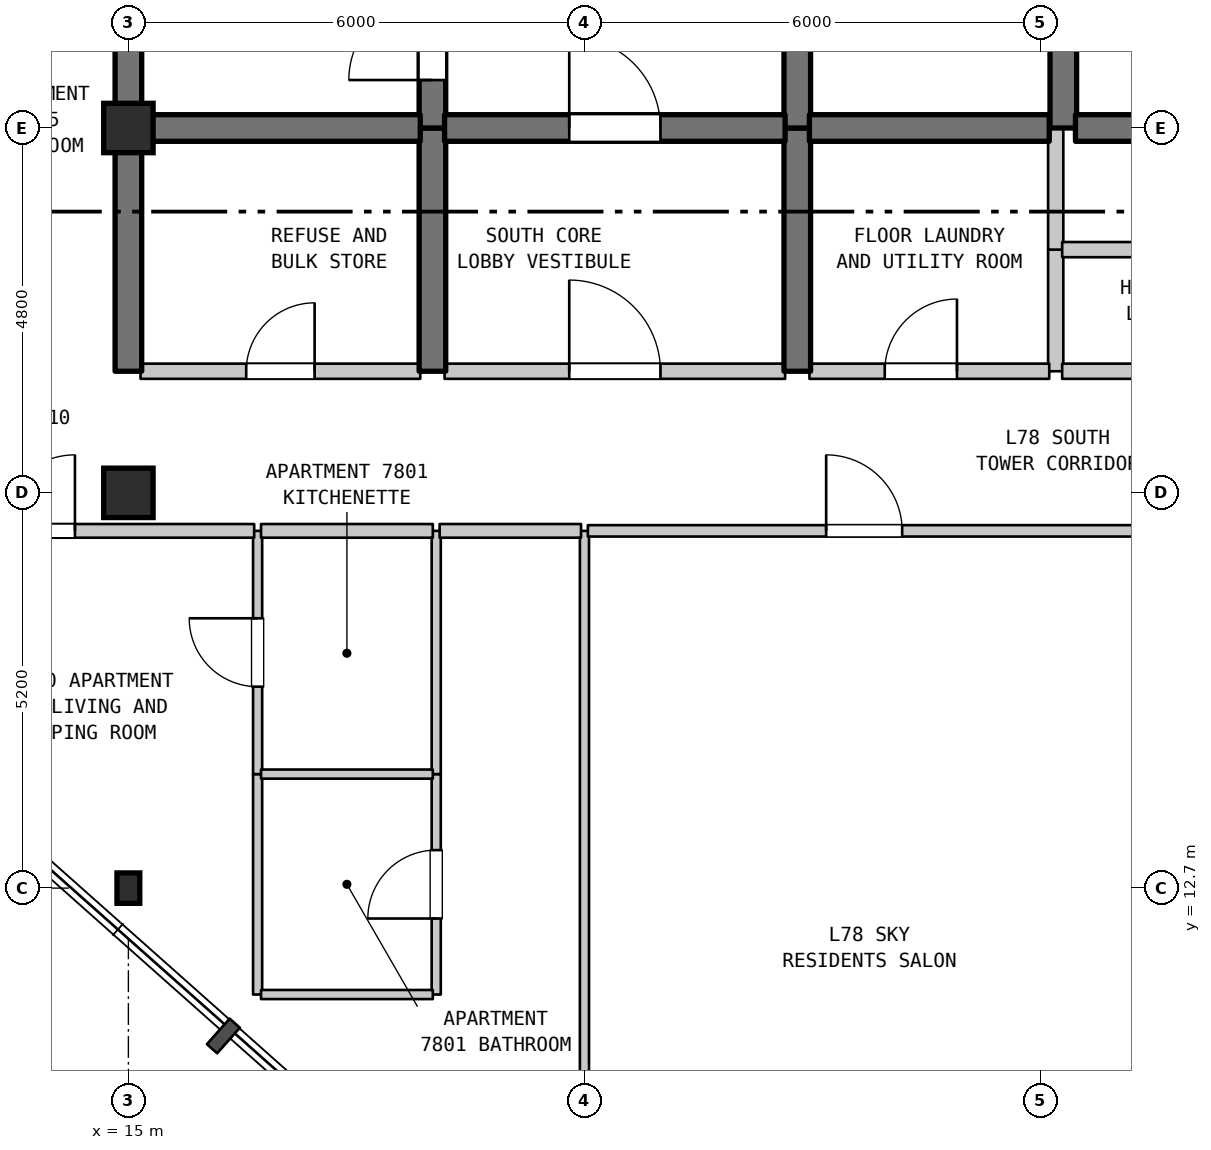
"""IFC4 building model, lengths in metres.
Left out: names, types, materials, properties, quantities, classifications, styles, units other than length and angle.
Written with IfcOpenShell. Run it as: python <this file> out.ifc"""

import sys

from ifc_helpers import new_model, si_unit, direction, frame, frame_2d, origin, origin_2d, place, context, subcontext, project, spatial, rectangle, i_section, extrude, element, fill, save


model = new_model("IFC4")
c1 = context("Model", 3, precision=1e-05, world=origin(), true_north=direction((0.0, 1.0)))
c2 = subcontext(c1, "Body", "Model", "MODEL_VIEW")
j1 = project(units=[si_unit("LENGTHUNIT", "METRE"), si_unit("PLANEANGLEUNIT", "RADIAN")], contexts=[c1])
p1 = place(None, origin())
s1 = spatial("IfcSite", under=j1, at=p1, CompositionType="ELEMENT")
p2 = place(p1, origin())
s2 = spatial("IfcBuilding", under=s1, at=p2, CompositionType="ELEMENT")
p3 = place(p2, frame((0.0, 0.0, 311.0)))
s3 = spatial("IfcBuildingStorey", under=s2, at=p3, CompositionType="ELEMENT", Elevation=311.0)
p4 = place(p3, frame((15.0, 12.7, 0.0), z_axis=(0.0, 0.0, 1.0), x_axis=(1.0, 0.0, 0.0)))
e1 = element("IfcColumn", 1, at=p4, inside=s3, PredefinedType="COLUMN", context=c2, shape_type="SweptSolid", body=[
    extrude(i_section(OverallWidth=0.3, OverallDepth=0.4, WebThickness=0.013, FlangeThickness=0.024, FilletRadius=0.027, at=origin_2d()), origin(), (0.0, 0.0, 1.0), 3.7),
])
for number, where, z_axis, x_axis in (
    (2, (15.0, 17.9, 0.0), (0.0, 0.0, 1.0), (1.0, 0.0, 0.0)),
    (3, (15.0, 22.7, 0.0), (0.0, 0.0, 1.0), (1.0, 0.0, 0.0)),
):
    element("IfcColumn", number, at=place(p3, frame(where, z_axis=z_axis, x_axis=x_axis)), inside=s3, PredefinedType="COLUMN", context=c2, shape_type="SweptSolid", body=[
        extrude(rectangle(XDim=0.65, YDim=0.65, at=origin_2d()), origin(), (0.0, 0.0, 1.0), 3.7),
    ])
p5 = place(p3, frame((15.0, 19.5, 0.0), z_axis=(0.0, 0.0, 1.0), x_axis=(0.0, 1.0, 0.0)))
e4 = element("IfcWall", 4, at=p5, inside=s3, PredefinedType="SHEAR", context=c2, shape_type="SweptSolid", body=[
    extrude(rectangle(XDim=3.2, YDim=0.35, at=frame_2d((1.6, 0.0))), origin(), (0.0, 0.0, 1.0), 3.28),
])
p6 = place(p3, frame((15.0, 22.7, 0.0), z_axis=(0.0, 0.0, 1.0), x_axis=(0.0, 1.0, 0.0)))
e5 = element("IfcWall", 5, at=p6, inside=s3, PredefinedType="SHEAR", context=c2, shape_type="SweptSolid", body=[
    extrude(rectangle(XDim=6.8, YDim=0.35, at=frame_2d((3.4, 0.0))), origin(), (0.0, 0.0, 1.0), 3.28),
])
p7 = place(p3, frame((16.7, 11.3, 0.0), z_axis=(0.0, 0.0, 1.0), x_axis=(0.0, 1.0, 0.0)))
e6 = element("IfcWall", 6, at=p7, inside=s3, PredefinedType="PARTITIONING", context=c2, shape_type="SweptSolid", body=[
    extrude(rectangle(XDim=2.9, YDim=0.12, at=frame_2d((1.45, 0.0))), origin(), (0.0, 0.0, 1.0), 3.28),
])
p8 = place(p3, frame((16.7, 14.2, 0.0), z_axis=(0.0, 0.0, 1.0), x_axis=(0.0, 1.0, 0.0)))
e7 = element("IfcWall", 7, at=p8, inside=s3, PredefinedType="PARTITIONING", context=c2, shape_type="SweptSolid", body=[
    extrude(rectangle(XDim=3.2, YDim=0.12, at=frame_2d((1.6, 0.0))), origin(), (0.0, 0.0, 1.0), 3.28),
])
p9 = place(p8, frame((1.15, 0.0, 0.0)))
e8 = element("IfcOpeningElement", 8, at=p9, cuts=e7, PredefinedType="OPENING", context=c2, shape_type="SweptSolid", body=[
    extrude(rectangle(XDim=0.9, YDim=2.15, at=frame_2d((0.45, 1.075))), frame((0.0, 0.07, 0.0), z_axis=(0.0, -1.0, 0.0), x_axis=(1.0, 0.0, 0.0)), (0.0, 0.0, 1.0), 0.14),
])
p10 = place(p3, frame((19.0, 19.5, 0.0), z_axis=(0.0, 0.0, 1.0), x_axis=(0.0, 1.0, 0.0)))
e9 = element("IfcWall", 9, at=p10, inside=s3, PredefinedType="SHEAR", context=c2, shape_type="SweptSolid", body=[
    extrude(rectangle(XDim=3.2, YDim=0.35, at=frame_2d((1.6, 0.0))), origin(), (0.0, 0.0, 1.0), 3.28),
])
p11 = place(p3, frame((19.0, 22.7, 0.0), z_axis=(0.0, 0.0, 1.0), x_axis=(0.0, 1.0, 0.0)))
e10 = element("IfcWall", 10, at=p11, inside=s3, PredefinedType="SHEAR", context=c2, shape_type="SweptSolid", body=[
    extrude(rectangle(XDim=5.5, YDim=0.35, at=frame_2d((2.75, 0.0))), origin(), (0.0, 0.0, 1.0), 3.28),
])
p12 = place(p11, frame((0.631, 0.0, 0.0)))
e11 = element("IfcOpeningElement", 11, at=p12, cuts=e10, PredefinedType="OPENING", context=c2, shape_type="SweptSolid", body=[
    extrude(rectangle(XDim=1.1, YDim=2.15, at=frame_2d((0.55, 1.075))), frame((0.0, 0.185, 0.0), z_axis=(0.0, -1.0, 0.0), x_axis=(1.0, 0.0, 0.0)), (0.0, 0.0, 1.0), 0.37),
])
p13 = place(p3, frame((19.05, 11.3, 0.0), z_axis=(0.0, 0.0, 1.0), x_axis=(0.0, 1.0, 0.0)))
e12 = element("IfcWall", 12, at=p13, inside=s3, PredefinedType="PARTITIONING", context=c2, shape_type="SweptSolid", body=[
    extrude(rectangle(XDim=2.9, YDim=0.12, at=frame_2d((1.45, 0.0))), origin(), (0.0, 0.0, 1.0), 3.28),
])
p14 = place(p13, frame((1.0, 0.0, 0.0)))
e13 = element("IfcOpeningElement", 13, at=p14, cuts=e12, PredefinedType="OPENING", context=c2, shape_type="SweptSolid", body=[
    extrude(rectangle(XDim=0.9, YDim=2.1, at=frame_2d((0.45, 1.05))), frame((0.0, 0.07, 0.0), z_axis=(0.0, -1.0, 0.0), x_axis=(1.0, 0.0, 0.0)), (0.0, 0.0, 1.0), 0.14),
])
p15 = place(p3, frame((19.05, 14.2, 0.0), z_axis=(0.0, 0.0, 1.0), x_axis=(0.0, 1.0, 0.0)))
e14 = element("IfcWall", 14, at=p15, inside=s3, PredefinedType="PARTITIONING", context=c2, shape_type="SweptSolid", body=[
    extrude(rectangle(XDim=3.2, YDim=0.12, at=frame_2d((1.6, 0.0))), origin(), (0.0, 0.0, 1.0), 3.28),
])
p16 = place(p3, frame((21.0, 6.999, 0.0), z_axis=(0.0, 0.0, 1.0), x_axis=(0.0, 1.0, 0.0)))
e15 = element("IfcWall", 15, at=p16, inside=s3, PredefinedType="PARTITIONING", context=c2, shape_type="SweptSolid", body=[
    extrude(rectangle(XDim=10.401, YDim=0.12, at=frame_2d((5.2, 0.0))), origin(), (0.0, 0.0, 1.0), 3.28),
])
p17 = place(p3, frame((23.8, 19.5, 0.0), z_axis=(0.0, 0.0, 1.0), x_axis=(0.0, 1.0, 0.0)))
e16 = element("IfcWall", 16, at=p17, inside=s3, PredefinedType="SHEAR", context=c2, shape_type="SweptSolid", body=[
    extrude(rectangle(XDim=3.2, YDim=0.35, at=frame_2d((1.6, 0.0))), origin(), (0.0, 0.0, 1.0), 3.28),
])
p18 = place(p3, frame((23.8, 22.7, 0.0), z_axis=(0.0, 0.0, 1.0), x_axis=(0.0, 1.0, 0.0)))
e17 = element("IfcWall", 17, at=p18, inside=s3, PredefinedType="SHEAR", context=c2, shape_type="SweptSolid", body=[
    extrude(rectangle(XDim=3.4, YDim=0.35, at=frame_2d((1.7, 0.0))), origin(), (0.0, 0.0, 1.0), 3.28),
])
p19 = place(p18, frame((1.25, 0.0, 0.0)))
e18 = element("IfcOpeningElement", 18, at=p19, cuts=e17, PredefinedType="OPENING", context=c2, shape_type="SweptSolid", body=[
    extrude(rectangle(XDim=0.9, YDim=2.15, at=frame_2d((0.45, 1.075))), frame((0.0, 0.185, 0.0), z_axis=(0.0, -1.0, 0.0), x_axis=(1.0, 0.0, 0.0)), (0.0, 0.0, 1.0), 0.37),
])
p20 = place(p3, frame((27.2, 19.5, 0.0), z_axis=(0.0, 0.0, 1.0), x_axis=(0.0, 1.0, 0.0)))
e19 = element("IfcWall", 19, at=p20, inside=s3, PredefinedType="STANDARD", context=c2, shape_type="SweptSolid", body=[
    extrude(rectangle(XDim=1.6, YDim=0.2, at=frame_2d((0.8, 0.0))), origin(), (0.0, 0.0, 1.0), 3.28),
])
p21 = place(p3, frame((27.2, 21.1, 0.0), z_axis=(0.0, 0.0, 1.0), x_axis=(0.0, 1.0, 0.0)))
e20 = element("IfcWall", 20, at=p21, inside=s3, PredefinedType="STANDARD", context=c2, shape_type="SweptSolid", body=[
    extrude(rectangle(XDim=1.6, YDim=0.2, at=frame_2d((0.8, 0.0))), origin(), (0.0, 0.0, 1.0), 3.28),
])
p22 = place(p3, frame((27.3, 22.7, 0.0), z_axis=(0.0, 0.0, 1.0), x_axis=(0.0, 1.0, 0.0)))
e21 = element("IfcWall", 21, at=p22, inside=s3, PredefinedType="SHEAR", context=c2, shape_type="SweptSolid", body=[
    extrude(rectangle(XDim=2.9, YDim=0.35, at=frame_2d((1.45, 0.0))), origin(), (0.0, 0.0, 1.0), 3.28),
])
for number, where, z_axis, x_axis in (
    (22, (16.745, 11.3, 0.0), (0.0, 0.0, 1.0), (1.0, 0.0, 0.0)),
    (23, (16.745, 14.2, 0.0), (0.0, 0.0, 1.0), (1.0, 0.0, 0.0)),
):
    element("IfcWall", number, at=place(p3, frame(where, z_axis=z_axis, x_axis=x_axis)), inside=s3, PredefinedType="PARTITIONING", context=c2, shape_type="SweptSolid", body=[
        extrude(rectangle(XDim=2.26, YDim=0.12, at=frame_2d((1.13, 0.0))), origin(), (0.0, 0.0, 1.0), 3.28),
    ])
p23 = place(p3, frame((12.975, 17.4, 0.0), z_axis=(0.0, 0.0, 1.0), x_axis=(1.0, 0.0, 0.0)))
e24 = element("IfcWall", 24, at=p23, inside=s3, PredefinedType="STANDARD", context=c2, shape_type="SweptSolid", body=[
    extrude(rectangle(XDim=3.68, YDim=0.18, at=frame_2d((1.84, 0.0))), origin(), (0.0, 0.0, 1.0), 3.28),
])
p24 = place(p23, frame((0.322, 0.0, 0.0)))
e25 = element("IfcOpeningElement", 25, at=p24, cuts=e24, PredefinedType="OPENING", context=c2, shape_type="SweptSolid", body=[
    extrude(rectangle(XDim=1.0, YDim=2.15, at=frame_2d((0.5, 1.075))), frame((0.0, 0.1, 0.0), z_axis=(0.0, -1.0, 0.0), x_axis=(1.0, 0.0, 0.0)), (0.0, 0.0, 1.0), 0.2),
])
p25 = place(p3, frame((16.745, 17.4, 0.0), z_axis=(0.0, 0.0, 1.0), x_axis=(1.0, 0.0, 0.0)))
e26 = element("IfcWall", 26, at=p25, inside=s3, PredefinedType="STANDARD", context=c2, shape_type="SweptSolid", body=[
    extrude(rectangle(XDim=2.26, YDim=0.18, at=frame_2d((1.13, 0.0))), origin(), (0.0, 0.0, 1.0), 3.28),
])
p26 = place(p3, frame((19.095, 17.4, 0.0), z_axis=(0.0, 0.0, 1.0), x_axis=(1.0, 0.0, 0.0)))
e27 = element("IfcWall", 27, at=p26, inside=s3, PredefinedType="STANDARD", context=c2, shape_type="SweptSolid", body=[
    extrude(rectangle(XDim=1.86, YDim=0.18, at=frame_2d((0.93, 0.0))), origin(), (0.0, 0.0, 1.0), 3.28),
])
p27 = place(p3, frame((21.045, 17.4, 0.0), z_axis=(0.0, 0.0, 1.0), x_axis=(1.0, 0.0, 0.0)))
e28 = element("IfcWall", 28, at=p27, inside=s3, PredefinedType="STANDARD", context=c2, shape_type="SweptSolid", body=[
    extrude(rectangle(XDim=7.41, YDim=0.15, at=frame_2d((3.705, 0.0))), origin(), (0.0, 0.0, 1.0), 3.28),
])
p28 = place(p27, frame((3.135, 0.0, 0.0)))
e29 = element("IfcOpeningElement", 29, at=p28, cuts=e28, PredefinedType="OPENING", context=c2, shape_type="SweptSolid", body=[
    extrude(rectangle(XDim=1.0, YDim=2.15, at=frame_2d((0.5, 1.075))), frame((0.0, 0.085, 0.0), z_axis=(0.0, -1.0, 0.0), x_axis=(1.0, 0.0, 0.0)), (0.0, 0.0, 1.0), 0.17),
])
p29 = place(p3, frame((15.16, 19.5, 0.0), z_axis=(0.0, 0.0, 1.0), x_axis=(1.0, 0.0, 0.0)))
e30 = element("IfcWall", 30, at=p29, inside=s3, PredefinedType="STANDARD", context=c2, shape_type="SweptSolid", body=[
    extrude(rectangle(XDim=3.68, YDim=0.2, at=frame_2d((1.84, 0.0))), origin(), (0.0, 0.0, 1.0), 3.28),
])
p30 = place(p29, frame((1.39, 0.0, 0.0)))
e31 = element("IfcOpeningElement", 31, at=p30, cuts=e30, PredefinedType="OPENING", context=c2, shape_type="SweptSolid", body=[
    extrude(rectangle(XDim=0.9, YDim=2.15, at=frame_2d((0.45, 1.075))), frame((0.0, 0.11, 0.0), z_axis=(0.0, -1.0, 0.0), x_axis=(1.0, 0.0, 0.0)), (0.0, 0.0, 1.0), 0.22),
])
p31 = place(p3, frame((19.16, 19.5, 0.0), z_axis=(0.0, 0.0, 1.0), x_axis=(1.0, 0.0, 0.0)))
e32 = element("IfcWall", 32, at=p31, inside=s3, PredefinedType="STANDARD", context=c2, shape_type="SweptSolid", body=[
    extrude(rectangle(XDim=4.48, YDim=0.2, at=frame_2d((2.24, 0.0))), origin(), (0.0, 0.0, 1.0), 3.28),
])
p32 = place(p31, frame((1.64, 0.0, 0.0)))
e33 = element("IfcOpeningElement", 33, at=p32, cuts=e32, PredefinedType="OPENING", context=c2, shape_type="SweptSolid", body=[
    extrude(rectangle(XDim=1.2, YDim=2.2, at=frame_2d((0.6, 1.1))), frame((0.0, 0.11, 0.0), z_axis=(0.0, -1.0, 0.0), x_axis=(1.0, 0.0, 0.0)), (0.0, 0.0, 1.0), 0.22),
])
p33 = place(p3, frame((23.96, 19.5, 0.0), z_axis=(0.0, 0.0, 1.0), x_axis=(1.0, 0.0, 0.0)))
e34 = element("IfcWall", 34, at=p33, inside=s3, PredefinedType="STANDARD", context=c2, shape_type="SweptSolid", body=[
    extrude(rectangle(XDim=3.155, YDim=0.2, at=frame_2d((1.578, 0.0))), origin(), (0.0, 0.0, 1.0), 3.28),
])
p34 = place(p33, frame((0.991, 0.0, 0.0)))
e35 = element("IfcOpeningElement", 35, at=p34, cuts=e34, PredefinedType="OPENING", context=c2, shape_type="SweptSolid", body=[
    extrude(rectangle(XDim=0.95, YDim=2.15, at=frame_2d((0.475, 1.075))), frame((0.0, 0.11, 0.0), z_axis=(0.0, -1.0, 0.0), x_axis=(1.0, 0.0, 0.0)), (0.0, 0.0, 1.0), 0.22),
])
p35 = place(p3, frame((27.285, 19.5, 0.0), z_axis=(0.0, 0.0, 1.0), x_axis=(1.0, 0.0, 0.0)))
e36 = element("IfcWall", 36, at=p35, inside=s3, PredefinedType="STANDARD", context=c2, shape_type="SweptSolid", body=[
    extrude(rectangle(XDim=3.43, YDim=0.2, at=frame_2d((1.715, 0.0))), origin(), (0.0, 0.0, 1.0), 3.28),
])
p36 = place(p35, frame((1.192, 0.0, 0.0)))
e37 = element("IfcOpeningElement", 37, at=p36, cuts=e36, PredefinedType="OPENING", context=c2, shape_type="SweptSolid", body=[
    extrude(rectangle(XDim=0.9, YDim=2.15, at=frame_2d((0.45, 1.075))), frame((0.0, 0.11, 0.0), z_axis=(0.0, -1.0, 0.0), x_axis=(1.0, 0.0, 0.0)), (0.0, 0.0, 1.0), 0.22),
])
p37 = place(p3, frame((27.285, 21.1, 0.0), z_axis=(0.0, 0.0, 1.0), x_axis=(1.0, 0.0, 0.0)))
e38 = element("IfcWall", 38, at=p37, inside=s3, PredefinedType="STANDARD", context=c2, shape_type="SweptSolid", body=[
    extrude(rectangle(XDim=3.355, YDim=0.2, at=frame_2d((1.677, 0.0))), origin(), (0.0, 0.0, 1.0), 3.28),
])
p38 = place(p3, frame((15.16, 22.7, 0.0), z_axis=(0.0, 0.0, 1.0), x_axis=(1.0, 0.0, 0.0)))
e39 = element("IfcWall", 39, at=p38, inside=s3, PredefinedType="SHEAR", context=c2, shape_type="SweptSolid", body=[
    extrude(rectangle(XDim=3.68, YDim=0.35, at=frame_2d((1.84, 0.0))), origin(), (0.0, 0.0, 1.0), 3.28),
])
p39 = place(p3, frame((19.16, 22.7, 0.0), z_axis=(0.0, 0.0, 1.0), x_axis=(1.0, 0.0, 0.0)))
e40 = element("IfcWall", 40, at=p39, inside=s3, PredefinedType="SHEAR", context=c2, shape_type="SweptSolid", body=[
    extrude(rectangle(XDim=4.48, YDim=0.35, at=frame_2d((2.24, 0.0))), origin(), (0.0, 0.0, 1.0), 3.28),
])
p40 = place(p39, frame((1.64, 0.0, 0.0)))
e41 = element("IfcOpeningElement", 41, at=p40, cuts=e40, PredefinedType="OPENING", context=c2, shape_type="SweptSolid", body=[
    extrude(rectangle(XDim=1.2, YDim=2.2, at=frame_2d((0.6, 1.1))), frame((0.0, 0.185, 0.0), z_axis=(0.0, -1.0, 0.0), x_axis=(1.0, 0.0, 0.0)), (0.0, 0.0, 1.0), 0.37),
])
p41 = place(p3, frame((23.96, 22.7, 0.0), z_axis=(0.0, 0.0, 1.0), x_axis=(1.0, 0.0, 0.0)))
e42 = element("IfcWall", 42, at=p41, inside=s3, PredefinedType="SHEAR", context=c2, shape_type="SweptSolid", body=[
    extrude(rectangle(XDim=3.155, YDim=0.35, at=frame_2d((1.578, 0.0))), origin(), (0.0, 0.0, 1.0), 3.28),
])
p42 = place(p3, frame((27.46, 22.7, 0.0), z_axis=(0.0, 0.0, 1.0), x_axis=(1.0, 0.0, 0.0)))
e43 = element("IfcWall", 43, at=p42, inside=s3, PredefinedType="SHEAR", context=c2, shape_type="SweptSolid", body=[
    extrude(rectangle(XDim=3.18, YDim=0.35, at=frame_2d((1.59, 0.0))), origin(), (0.0, 0.0, 1.0), 3.28),
])
p43 = place(p9, origin())
e44 = element("IfcDoor", 44, at=p43, inside=s3, OperationType="SINGLE_SWING_RIGHT", PredefinedType="DOOR", context=c2, shape_type="SweptSolid", body=[
    extrude(rectangle(XDim=0.9, YDim=2.15, at=frame_2d((0.45, 1.075))), frame((0.0, 0.025, 0.0), z_axis=(0.0, -1.0, 0.0), x_axis=(1.0, 0.0, 0.0)), (0.0, 0.0, 1.0), 0.05),
])
fill(e8, e44)
p44 = place(p12, origin())
e45 = element("IfcDoor", 45, at=p44, inside=s3, OperationType="SINGLE_SWING_LEFT", PredefinedType="DOOR", context=c2, shape_type="SweptSolid", body=[
    extrude(rectangle(XDim=1.1, YDim=2.15, at=frame_2d((0.55, 1.075))), frame((0.0, 0.025, 0.0), z_axis=(0.0, -1.0, 0.0), x_axis=(1.0, 0.0, 0.0)), (0.0, 0.0, 1.0), 0.05),
])
fill(e11, e45)
p45 = place(p14, origin())
e46 = element("IfcDoor", 46, at=p45, inside=s3, OperationType="SINGLE_SWING_LEFT", PredefinedType="DOOR", context=c2, shape_type="SweptSolid", body=[
    extrude(rectangle(XDim=0.9, YDim=2.1, at=frame_2d((0.45, 1.05))), frame((0.0, 0.025, 0.0), z_axis=(0.0, -1.0, 0.0), x_axis=(1.0, 0.0, 0.0)), (0.0, 0.0, 1.0), 0.05),
])
fill(e13, e46)
p46 = place(p24, origin())
e47 = element("IfcDoor", 47, at=p46, inside=s3, OperationType="SINGLE_SWING_RIGHT", PredefinedType="DOOR", context=c2, shape_type="SweptSolid", body=[
    extrude(rectangle(XDim=1.0, YDim=2.15, at=frame_2d((0.5, 1.075))), frame((0.0, 0.025, 0.0), z_axis=(0.0, -1.0, 0.0), x_axis=(1.0, 0.0, 0.0)), (0.0, 0.0, 1.0), 0.05),
])
fill(e25, e47)
p47 = place(p28, origin())
e48 = element("IfcDoor", 48, at=p47, inside=s3, OperationType="SINGLE_SWING_LEFT", PredefinedType="DOOR", context=c2, shape_type="SweptSolid", body=[
    extrude(rectangle(XDim=1.0, YDim=2.15, at=frame_2d((0.5, 1.075))), frame((0.0, 0.025, 0.0), z_axis=(0.0, -1.0, 0.0), x_axis=(1.0, 0.0, 0.0)), (0.0, 0.0, 1.0), 0.05),
])
fill(e29, e48)
p48 = place(p30, origin())
e49 = element("IfcDoor", 49, at=p48, inside=s3, OperationType="SINGLE_SWING_RIGHT", PredefinedType="DOOR", context=c2, shape_type="SweptSolid", body=[
    extrude(rectangle(XDim=0.9, YDim=2.15, at=frame_2d((0.45, 1.075))), frame((0.0, 0.025, 0.0), z_axis=(0.0, -1.0, 0.0), x_axis=(1.0, 0.0, 0.0)), (0.0, 0.0, 1.0), 0.05),
])
fill(e31, e49)
p49 = place(p32, origin())
e50 = element("IfcDoor", 50, at=p49, inside=s3, OperationType="SINGLE_SWING_LEFT", PredefinedType="DOOR", context=c2, shape_type="SweptSolid", body=[
    extrude(rectangle(XDim=1.2, YDim=2.2, at=frame_2d((0.6, 1.1))), frame((0.0, 0.025, 0.0), z_axis=(0.0, -1.0, 0.0), x_axis=(1.0, 0.0, 0.0)), (0.0, 0.0, 1.0), 0.05),
])
fill(e33, e50)
p50 = place(p34, origin())
e51 = element("IfcDoor", 51, at=p50, inside=s3, OperationType="SINGLE_SWING_RIGHT", PredefinedType="DOOR", context=c2, shape_type="SweptSolid", body=[
    extrude(rectangle(XDim=0.95, YDim=2.15, at=frame_2d((0.475, 1.075))), frame((0.0, 0.025, 0.0), z_axis=(0.0, -1.0, 0.0), x_axis=(1.0, 0.0, 0.0)), (0.0, 0.0, 1.0), 0.05),
])
fill(e35, e51)
p51 = place(p40, origin())
e52 = element("IfcDoor", 52, at=p51, inside=s3, OperationType="SINGLE_SWING_LEFT", PredefinedType="DOOR", context=c2, shape_type="SweptSolid", body=[
    extrude(rectangle(XDim=1.2, YDim=2.2, at=frame_2d((0.6, 1.1))), frame((0.0, 0.025, 0.0), z_axis=(0.0, -1.0, 0.0), x_axis=(1.0, 0.0, 0.0)), (0.0, 0.0, 1.0), 0.05),
])
fill(e41, e52)
save(model, sys.argv[1])
